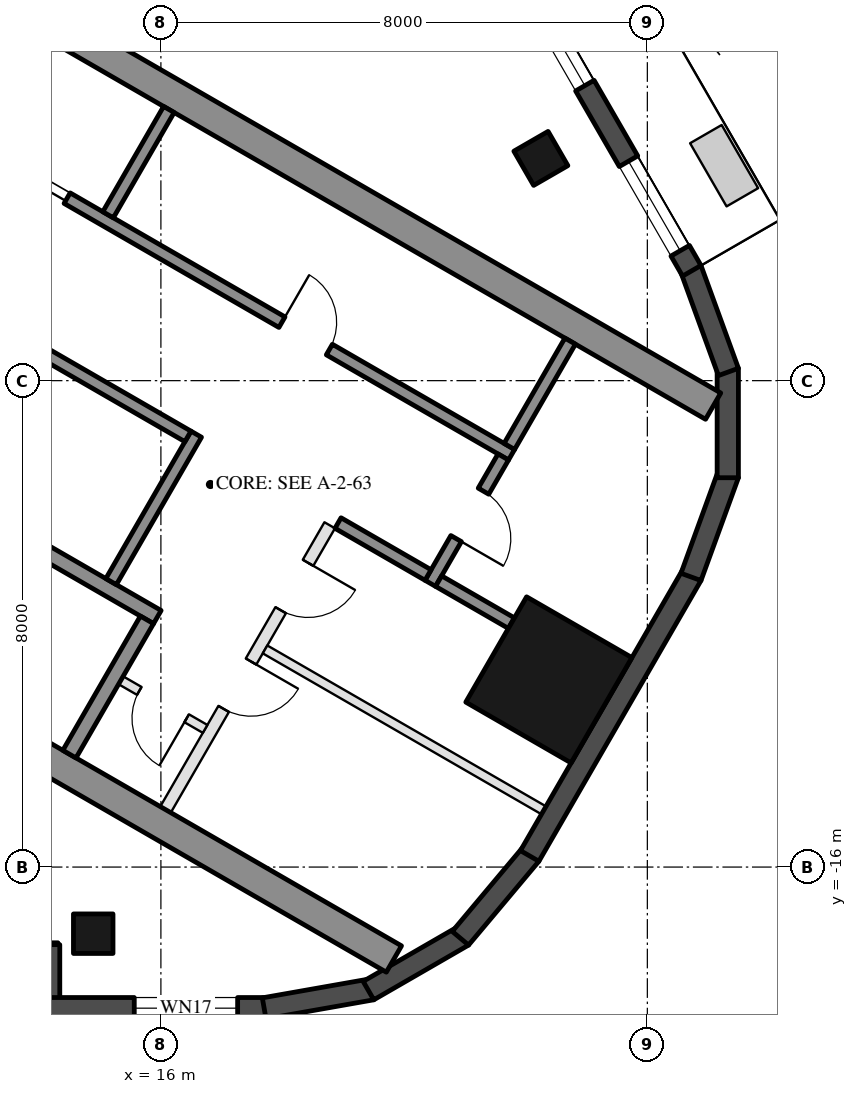
"""IFC4 building model, lengths in metres.
Left out: names, types, materials, properties, quantities, classifications, styles, units other than length and angle.
Written with IfcOpenShell. Run it as: python <this file> out.ifc"""

import sys

from ifc_helpers import new_model, si_unit, direction, frame, frame_2d, origin, origin_2d, place, context, subcontext, project, spatial, rectangle, hollow_rectangle, extrude, boolean, halfspace, element, fill, save


model = new_model("IFC4")
c1 = context("Model", 3, precision=1e-05, world=origin(), true_north=direction((0.0, 1.0)))
c2 = subcontext(c1, "Body", "Model", "MODEL_VIEW")
j1 = project(units=[si_unit("LENGTHUNIT", "METRE"), si_unit("PLANEANGLEUNIT", "RADIAN")], contexts=[c1])
p1 = place(None, origin())
s1 = spatial("IfcSite", under=j1, at=p1, CompositionType="ELEMENT")
p2 = place(p1, origin())
s2 = spatial("IfcBuilding", under=s1, at=p2, CompositionType="ELEMENT")
p3 = place(p2, frame((0.0, 0.0, 272.6)))
s3 = spatial("IfcBuildingStorey", under=s2, at=p3, CompositionType="ELEMENT", Elevation=272.6)
for number, where, z_axis, x_axis in (
    (1, (14.887, -17.096, 0.0), (0.0, 0.0, 1.0), (-1.0, 0.0, 0.0)),
    (2, (22.249, -4.345, 0.0), (0.0, 0.0, 1.0), (-0.5, 0.866, 0.0)),
):
    element("IfcColumn", number, at=place(p3, frame(where, z_axis=z_axis, x_axis=x_axis)), inside=s3, PredefinedType="COLUMN", context=c2, shape_type="SweptSolid", body=[
        boolean("DIFFERENCE", extrude(hollow_rectangle(XDim=0.65, YDim=0.65, WallThickness=0.03, at=origin_2d()), origin(), (0.0, 0.0, 1.0), 3.7), halfspace(frame((0.0, 0.0, 3.653), z_axis=(0.0, 0.0, 1.0), x_axis=(1.0, 0.0, 0.0)), False)),
    ])
p4 = place(p3, frame((22.38, -12.921, 0.0), z_axis=(0.0, 0.0, 1.0), x_axis=(0.5, 0.866025403784, 0.0)))
e3 = element("IfcColumn", 3, at=p4, inside=s3, PredefinedType="COLUMN", context=c2, shape_type="SweptSolid", body=[
    boolean("DIFFERENCE", extrude(hollow_rectangle(XDim=2.0, YDim=2.0, WallThickness=0.05, at=origin_2d()), origin(), (0.0, 0.0, 1.0), 3.7), halfspace(frame((0.0, 0.0, 3.587), z_axis=(0.0, 0.0, 1.0), x_axis=(1.0, 0.0, 0.0)), False)),
])
p5 = place(p3, frame((8.024, -17.421, 0.0), z_axis=(0.0, 0.0, 1.0), x_axis=(1.0, 0.0, 0.0)))
e4 = element("IfcWall", 4, at=p5, inside=s3, PredefinedType="SOLIDWALL", context=c2, shape_type="SweptSolid", body=[
    extrude(rectangle(XDim=6.283, YDim=0.35, at=frame_2d((3.142, 0.0))), origin(), (0.0, 0.0, 1.0), 3.55),
])
p6 = place(p5, frame((3.563, 0.0, 0.0)))
e5 = element("IfcOpeningElement", 5, at=p6, cuts=e4, PredefinedType="OPENING", context=c2, shape_type="SweptSolid", body=[
    extrude(rectangle(XDim=2.4, YDim=2.4, at=frame_2d((1.2, 1.2))), frame((0.0, 0.185, 0.0), z_axis=(0.0, -1.0, 0.0), x_axis=(1.0, 0.0, 0.0)), (0.0, 0.0, 1.0), 0.37),
])
p7 = place(p5, frame((0.77, 0.0, 0.3)))
e6 = element("IfcOpeningElement", 6, at=p7, cuts=e4, PredefinedType="OPENING", context=c2, shape_type="SweptSolid", body=[
    extrude(rectangle(XDim=2.4, YDim=2.65, at=frame_2d((1.2, 1.325))), frame((0.0, 0.185, 0.0), z_axis=(0.0, -1.0, 0.0), x_axis=(1.0, 0.0, 0.0)), (0.0, 0.0, 1.0), 0.37),
])
p8 = place(p3, frame((14.162, -17.276, 0.0), z_axis=(0.0, 0.0, 1.0), x_axis=(0.0, -1.0, 0.0)))
e7 = element("IfcWall", 7, at=p8, inside=s3, PredefinedType="SOLIDWALL", context=c2, shape_type="SweptSolid", body=[
    extrude(rectangle(XDim=1.22, YDim=0.35, at=frame_2d((0.61, 0.0))), origin(), (0.0, 0.0, 1.0), 3.55),
])
p9 = place(p3, frame((13.987, -18.321, 0.0), z_axis=(0.0, 0.0, 1.0), x_axis=(1.0, 0.0, 0.0)))
e8 = element("IfcWall", 8, at=p9, inside=s3, PredefinedType="SOLIDWALL", context=c2, shape_type="SweptSolid", body=[
    extrude(rectangle(XDim=3.742, YDim=0.35, at=frame_2d((1.871, 0.0))), origin(), (0.0, 0.0, 1.0), 3.55),
])
p10 = place(p9, frame((1.575, 0.0, 0.3)))
e9 = element("IfcOpeningElement", 9, at=p10, cuts=e8, PredefinedType="OPENING", context=c2, shape_type="SweptSolid", body=[
    extrude(rectangle(XDim=1.7, YDim=2.65, at=frame_2d((0.85, 1.325))), frame((0.0, 0.185, 0.0), z_axis=(0.0, -1.0, 0.0), x_axis=(1.0, 0.0, 0.0)), (0.0, 0.0, 1.0), 0.37),
])
p11 = place(p3, frame((17.698, -18.323, 0.0), z_axis=(0.0, 0.0, 1.0), x_axis=(0.984810858511, 0.173630564586, 0.0)))
e10 = element("IfcWall", 10, at=p11, inside=s3, PredefinedType="SOLIDWALL", context=c2, shape_type="SweptSolid", body=[
    extrude(rectangle(XDim=1.8, YDim=0.35, at=frame_2d((0.9, 0.0))), origin(), (0.0, 0.0, 1.0), 3.55),
])
p12 = place(p3, frame((19.414, -18.032, 0.0), z_axis=(0.0, 0.0, 1.0), x_axis=(0.866047807691, 0.499961193289, 0.0)))
e11 = element("IfcWall", 11, at=p12, inside=s3, PredefinedType="SOLIDWALL", context=c2, shape_type="SweptSolid", body=[
    extrude(rectangle(XDim=1.8, YDim=0.35, at=frame_2d((0.9, 0.0))), origin(), (0.0, 0.0, 1.0), 3.55),
])
p13 = place(p3, frame((20.926, -17.171, 0.0), z_axis=(0.0, 0.0, 1.0), x_axis=(0.642756114672, 0.766070869471, 0.0)))
e12 = element("IfcWall", 12, at=p13, inside=s3, PredefinedType="SOLIDWALL", context=c2, shape_type="SweptSolid", body=[
    extrude(rectangle(XDim=1.8, YDim=0.35, at=frame_2d((0.9, 0.0))), origin(), (0.0, 0.0, 1.0), 3.55),
])
p14 = place(p3, frame((22.065, -15.817, 0.0), z_axis=(0.0, 0.0, 1.0), x_axis=(0.500025039717, 0.866010946615, 0.0)))
e13 = element("IfcWall", 13, at=p14, inside=s3, PredefinedType="SOLIDWALL", context=c2, shape_type="SweptSolid", body=[
    extrude(rectangle(XDim=5.331, YDim=0.35, at=frame_2d((2.666, 0.0))), origin(), (0.0, 0.0, 1.0), 3.55),
])
p15 = place(p3, frame((24.718, -11.228, 0.0), z_axis=(0.0, 0.0, 1.0), x_axis=(0.34206975284, 0.939674562916, 0.0)))
e14 = element("IfcWall", 14, at=p15, inside=s3, PredefinedType="SOLIDWALL", context=c2, shape_type="SweptSolid", body=[
    extrude(rectangle(XDim=1.8, YDim=0.35, at=frame_2d((0.9, 0.0))), origin(), (0.0, 0.0, 1.0), 3.55),
])
p16 = place(p3, frame((25.323, -9.597, 0.0), z_axis=(0.0, 0.0, 1.0), x_axis=(0.0, 1.0, 0.0)))
e15 = element("IfcWall", 15, at=p16, inside=s3, PredefinedType="SOLIDWALL", context=c2, shape_type="SweptSolid", body=[
    extrude(rectangle(XDim=1.8, YDim=0.35, at=frame_2d((0.9, 0.0))), origin(), (0.0, 0.0, 1.0), 3.55),
])
p17 = place(p3, frame((25.333, -7.857, 0.0), z_axis=(0.0, 0.0, 1.0), x_axis=(-0.34206975284, 0.939674562916, 0.0)))
e16 = element("IfcWall", 16, at=p17, inside=s3, PredefinedType="SOLIDWALL", context=c2, shape_type="SweptSolid", body=[
    extrude(rectangle(XDim=1.8, YDim=0.35, at=frame_2d((0.9, 0.0))), origin(), (0.0, 0.0, 1.0), 3.55),
])
p18 = place(p3, frame((24.731, -6.193, 0.0), z_axis=(0.0, 0.0, 1.0), x_axis=(-0.500007749075, 0.866020929808, 0.0)))
e17 = element("IfcWall", 17, at=p18, inside=s3, PredefinedType="SOLIDWALL", context=c2, shape_type="SweptSolid", body=[
    extrude(rectangle(XDim=11.185, YDim=0.35, at=frame_2d((5.593, 0.0))), origin(), (0.0, 0.0, 1.0), 3.55),
])
p19 = place(p18, frame((0.381, 0.0, 0.3)))
e18 = element("IfcOpeningElement", 18, at=p19, cuts=e17, PredefinedType="OPENING", context=c2, shape_type="SweptSolid", body=[
    extrude(rectangle(XDim=1.7, YDim=2.65, at=frame_2d((0.85, 1.325))), frame((0.0, 0.185, 0.0), z_axis=(0.0, -1.0, 0.0), x_axis=(1.0, 0.0, 0.0)), (0.0, 0.0, 1.0), 0.37),
])
p20 = place(p18, frame((7.21, 0.0, 0.0)))
e19 = element("IfcOpeningElement", 19, at=p20, cuts=e17, PredefinedType="OPENING", context=c2, shape_type="SweptSolid", body=[
    extrude(rectangle(XDim=2.4, YDim=2.4, at=frame_2d((1.2, 1.2))), frame((0.0, 0.185, 0.0), z_axis=(0.0, -1.0, 0.0), x_axis=(1.0, 0.0, 0.0)), (0.0, 0.0, 1.0), 0.37),
])
p21 = place(p18, frame((3.517, 0.0, 0.3)))
e20 = element("IfcOpeningElement", 20, at=p21, cuts=e17, PredefinedType="OPENING", context=c2, shape_type="SweptSolid", body=[
    extrude(rectangle(XDim=1.5, YDim=2.65, at=frame_2d((0.75, 1.325))), frame((0.0, 0.185, 0.0), z_axis=(0.0, -1.0, 0.0), x_axis=(1.0, 0.0, 0.0)), (0.0, 0.0, 1.0), 0.37),
])
p22 = place(p18, frame((5.317, 0.0, 0.3)))
e21 = element("IfcOpeningElement", 21, at=p22, cuts=e17, PredefinedType="OPENING", context=c2, shape_type="SweptSolid", body=[
    extrude(rectangle(XDim=1.5, YDim=2.65, at=frame_2d((0.75, 1.325))), frame((0.0, 0.185, 0.0), z_axis=(0.0, -1.0, 0.0), x_axis=(1.0, 0.0, 0.0)), (0.0, 0.0, 1.0), 0.37),
])
for number, where, z_axis, x_axis in (
    (22, (8.547, -10.997, 0.0), (0.0, 0.0, 1.0), (0.866, -0.5, 0.0)),
    (23, (13.797, -1.903, 0.0), (0.0, 0.0, 1.0), (0.866, -0.5, 0.0)),
):
    element("IfcWall", number, at=place(p3, frame(where, z_axis=z_axis, x_axis=x_axis)), inside=s3, PredefinedType="SHEAR", context=c2, shape_type="SweptSolid", body=[
        extrude(rectangle(XDim=13.031, YDim=0.5, at=frame_2d((6.516, 0.0))), origin(), (0.0, 0.0, 1.0), 3.5),
    ])
p23 = place(p3, frame((10.356, -8.664, 0.0), z_axis=(0.0, 0.0, 1.0), x_axis=(0.866028629588, -0.499994412703, 0.0)))
e24 = element("IfcWall", 24, at=p23, inside=s3, PredefinedType="SHEAR", context=c2, shape_type="SweptSolid", body=[
    extrude(rectangle(XDim=6.45, YDim=0.25, at=frame_2d((3.225, 0.0))), origin(), (0.0, 0.0, 1.0), 3.5),
])
p24 = place(p23, frame((0.3, 0.0, 0.0)))
e25 = element("IfcOpeningElement", 25, at=p24, cuts=e24, PredefinedType="OPENING", context=c2, shape_type="SweptSolid", body=[
    extrude(rectangle(XDim=1.0, YDim=2.1, at=frame_2d((0.5, 1.05))), frame((0.0, 0.135, 0.0), z_axis=(0.0, -1.0, 0.0), x_axis=(1.0, 0.0, 0.0)), (0.0, 0.0, 1.0), 0.27),
])
p25 = place(p3, frame((14.496, -14.143, 0.0), z_axis=(0.0, 0.0, 1.0), x_axis=(0.500062241894, 0.865989465428, 0.0)))
e26 = element("IfcWall", 26, at=p25, inside=s3, PredefinedType="SHEAR", context=c2, shape_type="SweptSolid", body=[
    extrude(rectangle(XDim=2.55, YDim=0.25, at=frame_2d((1.275, 0.0))), origin(), (0.0, 0.0, 1.0), 3.5),
])
p26 = place(p3, frame((15.181, -11.305, 0.0), z_axis=(0.0, 0.0, 1.0), x_axis=(0.49994636267, 0.866056369097, 0.0)))
e27 = element("IfcWall", 27, at=p26, inside=s3, PredefinedType="SHEAR", context=c2, shape_type="SweptSolid", body=[
    extrude(rectangle(XDim=2.8, YDim=0.2, at=frame_2d((1.4, 0.0))), origin(), (0.0, 0.0, 1.0), 3.5),
])
p27 = place(p3, frame((14.02, -7.517, 0.0), z_axis=(0.0, 0.0, 1.0), x_axis=(0.866034573852, -0.49998411664, 0.0)))
e28 = element("IfcWall", 28, at=p27, inside=s3, PredefinedType="SHEAR", context=c2, shape_type="SweptSolid", body=[
    extrude(rectangle(XDim=2.8, YDim=0.2, at=frame_2d((1.4, 0.0))), origin(), (0.0, 0.0, 1.0), 3.5),
])
p28 = place(p3, frame((12.968, -4.138, 0.0), z_axis=(0.0, 0.0, 1.0), x_axis=(0.866028328073, -0.49999493495, 0.0)))
e29 = element("IfcWall", 29, at=p28, inside=s3, PredefinedType="SHEAR", context=c2, shape_type="SweptSolid", body=[
    extrude(rectangle(XDim=10.16, YDim=0.2, at=frame_2d((5.08, 0.0))), origin(), (0.0, 0.0, 1.0), 3.5),
])
p29 = place(p28, frame((0.62, 0.0, 0.0)))
e30 = element("IfcOpeningElement", 30, at=p29, cuts=e29, PredefinedType="OPENING", context=c2, shape_type="SweptSolid", body=[
    extrude(rectangle(XDim=1.1, YDim=2.1, at=frame_2d((0.55, 1.05))), frame((0.0, 0.11, 0.0), z_axis=(0.0, -1.0, 0.0), x_axis=(1.0, 0.0, 0.0)), (0.0, 0.0, 1.0), 0.22),
])
p30 = place(p28, frame((5.8, 0.0, 0.0)))
e31 = element("IfcOpeningElement", 31, at=p30, cuts=e29, PredefinedType="OPENING", context=c2, shape_type="SweptSolid", body=[
    extrude(rectangle(XDim=0.9, YDim=2.1, at=frame_2d((0.45, 1.05))), frame((0.0, 0.11, 0.0), z_axis=(0.0, -1.0, 0.0), x_axis=(1.0, 0.0, 0.0)), (0.0, 0.0, 1.0), 0.22),
])
p31 = place(p3, frame((20.43, -11.333, 0.0), z_axis=(0.0, 0.0, 1.0), x_axis=(0.500001309137, 0.866024647952, 0.0)))
e32 = element("IfcWall", 32, at=p31, inside=s3, PredefinedType="SHEAR", context=c2, shape_type="SweptSolid", body=[
    extrude(rectangle(XDim=2.4, YDim=0.2, at=frame_2d((1.2, 0.0))), origin(), (0.0, 0.0, 1.0), 3.5),
])
p32 = place(p31, frame((0.85, 0.0, 0.0)))
e33 = element("IfcOpeningElement", 33, at=p32, cuts=e32, PredefinedType="OPENING", context=c2, shape_type="SweptSolid", body=[
    extrude(rectangle(XDim=0.9, YDim=2.1, at=frame_2d((0.45, 1.05))), frame((0.0, 0.11, 0.0), z_axis=(0.0, -1.0, 0.0), x_axis=(1.0, 0.0, 0.0)), (0.0, 0.0, 1.0), 0.22),
])
p33 = place(p3, frame((18.913, -10.342, 0.0), z_axis=(0.0, 0.0, 1.0), x_axis=(0.866038183914, -0.499977863513, 0.0)))
e34 = element("IfcWall", 34, at=p33, inside=s3, PredefinedType="SHEAR", context=c2, shape_type="SweptSolid", body=[
    extrude(rectangle(XDim=1.71, YDim=0.2, at=frame_2d((0.855, 0.0))), origin(), (0.0, 0.0, 1.0), 3.5),
])
for number, where, z_axis, x_axis in (
    (35, (15.131, -5.272, 0.0), (0.0, 0.0, 1.0), (0.5, 0.866, 0.0)),
    (36, (21.73, -9.082, 0.0), (0.0, 0.0, 1.0), (0.5, 0.866, 0.0)),
):
    element("IfcWall", number, at=place(p3, frame(where, z_axis=z_axis, x_axis=x_axis)), inside=s3, PredefinedType="SHEAR", context=c2, shape_type="SweptSolid", body=[
        extrude(rectangle(XDim=2.0, YDim=0.2, at=frame_2d((1.0, 0.0))), origin(), (0.0, 0.0, 1.0), 3.5),
    ])
p34 = place(p3, frame((20.567, -11.297, 0.0), z_axis=(0.0, 0.0, 1.0), x_axis=(0.866094443108, -0.499880401313, 0.0)))
e37 = element("IfcWall", 37, at=p34, inside=s3, PredefinedType="SHEAR", context=c2, shape_type="SweptSolid", body=[
    extrude(rectangle(XDim=1.383, YDim=0.2, at=frame_2d((0.691, 0.0))), origin(), (0.0, 0.0, 1.0), 3.5),
])
p35 = place(p3, frame((16.076, -15.055, 0.0), z_axis=(0.0, 0.0, 1.0), x_axis=(0.499995103361, 0.866028230842, 0.0)))
e38 = element("IfcWall", 38, at=p35, inside=s3, PredefinedType="PARTITIONING", context=c2, shape_type="SweptSolid", body=[
    extrude(rectangle(XDim=5.4, YDim=0.2, at=frame_2d((2.7, 0.0))), origin(), (0.0, 0.0, 1.0), 3.5),
])
p36 = place(p35, frame((1.913, 0.0, 0.0)))
e39 = element("IfcOpeningElement", 39, at=p36, cuts=e38, PredefinedType="OPENING", context=c2, shape_type="SweptSolid", body=[
    extrude(rectangle(XDim=0.9, YDim=2.1, at=frame_2d((0.45, 1.05))), frame((0.0, 0.11, 0.0), z_axis=(0.0, -1.0, 0.0), x_axis=(1.0, 0.0, 0.0)), (0.0, 0.0, 1.0), 0.22),
])
p37 = place(p35, frame((3.788, 0.0, 0.0)))
e40 = element("IfcOpeningElement", 40, at=p37, cuts=e38, PredefinedType="OPENING", context=c2, shape_type="SweptSolid", body=[
    extrude(rectangle(XDim=0.9, YDim=2.1, at=frame_2d((0.45, 1.05))), frame((0.0, 0.11, 0.0), z_axis=(0.0, -1.0, 0.0), x_axis=(1.0, 0.0, 0.0)), (0.0, 0.0, 1.0), 0.22),
])
p38 = place(p3, frame((15.342, -12.928, 0.0), z_axis=(0.0, 0.0, 1.0), x_axis=(0.865989903783, -0.500061482766, 0.0)))
e41 = element("IfcWall", 41, at=p38, inside=s3, PredefinedType="PARTITIONING", context=c2, shape_type="SweptSolid", body=[
    extrude(rectangle(XDim=1.6, YDim=0.15, at=frame_2d((0.8, 0.0))), origin(), (0.0, 0.0, 1.0), 3.5),
])
p39 = place(p38, frame((0.35, 0.0, 0.0)))
e42 = element("IfcOpeningElement", 42, at=p39, cuts=e41, PredefinedType="OPENING", context=c2, shape_type="SweptSolid", body=[
    extrude(rectangle(XDim=0.9, YDim=2.1, at=frame_2d((0.45, 1.05))), frame((0.0, 0.085, 0.0), z_axis=(0.0, -1.0, 0.0), x_axis=(1.0, 0.0, 0.0)), (0.0, 0.0, 1.0), 0.17),
])
p40 = place(p3, frame((17.713, -12.42, 0.0), z_axis=(0.0, 0.0, 1.0), x_axis=(0.866028878405, -0.499993981732, 0.0)))
e43 = element("IfcWall", 43, at=p40, inside=s3, PredefinedType="PARTITIONING", context=c2, shape_type="SweptSolid", body=[
    extrude(rectangle(XDim=5.292, YDim=0.15, at=frame_2d((2.646, 0.0))), origin(), (0.0, 0.0, 1.0), 3.5),
])
p41 = place(p10, origin())
e44 = element("IfcWindow", 44, at=p41, inside=s3, PartitioningType="SINGLE_PANEL", PredefinedType="WINDOW", context=c2, shape_type="SweptSolid", body=[
    extrude(rectangle(XDim=1.7, YDim=2.65, at=frame_2d((0.85, 1.325))), frame((0.0, 0.03, 0.0), z_axis=(0.0, -1.0, 0.0), x_axis=(1.0, 0.0, 0.0)), (0.0, 0.0, 1.0), 0.06),
])
fill(e9, e44)
p42 = place(p19, origin())
e45 = element("IfcWindow", 45, at=p42, inside=s3, PartitioningType="SINGLE_PANEL", PredefinedType="WINDOW", context=c2, shape_type="SweptSolid", body=[
    extrude(rectangle(XDim=1.7, YDim=2.65, at=frame_2d((0.85, 1.325))), frame((0.0, 0.03, 0.0), z_axis=(0.0, -1.0, 0.0), x_axis=(1.0, 0.0, 0.0)), (0.0, 0.0, 1.0), 0.06),
])
fill(e18, e45)
p43 = place(p21, origin())
e46 = element("IfcWindow", 46, at=p43, inside=s3, PartitioningType="SINGLE_PANEL", PredefinedType="WINDOW", context=c2, shape_type="SweptSolid", body=[
    extrude(rectangle(XDim=1.5, YDim=2.65, at=frame_2d((0.75, 1.325))), frame((0.0, 0.03, 0.0), z_axis=(0.0, -1.0, 0.0), x_axis=(1.0, 0.0, 0.0)), (0.0, 0.0, 1.0), 0.06),
])
fill(e20, e46)
p44 = place(p39, frame((0.9, 0.0, 0.0), z_axis=(0.0, 0.0, 1.0), x_axis=(-1.0, 0.0, 0.0)))
e47 = element("IfcDoor", 47, at=p44, inside=s3, OperationType="SINGLE_SWING_LEFT", PredefinedType="DOOR", context=c2, shape_type="SweptSolid", body=[
    extrude(rectangle(XDim=0.9, YDim=2.1, at=frame_2d((0.45, 1.05))), frame((0.0, 0.025, 0.0), z_axis=(0.0, -1.0, 0.0), x_axis=(1.0, 0.0, 0.0)), (0.0, 0.0, 1.0), 0.05),
])
fill(e42, e47)
p45 = place(p29, origin())
e48 = element("IfcDoor", 48, at=p45, inside=s3, OperationType="DOUBLE_DOOR_SLIDING", PredefinedType="DOOR", context=c2, shape_type="SweptSolid", body=[
    extrude(rectangle(XDim=1.1, YDim=2.1, at=frame_2d((0.55, 1.05))), frame((0.0, 0.025, 0.0), z_axis=(0.0, -1.0, 0.0), x_axis=(1.0, 0.0, 0.0)), (0.0, 0.0, 1.0), 0.05),
])
fill(e30, e48)
p46 = place(p30, origin())
e49 = element("IfcDoor", 49, at=p46, inside=s3, OperationType="SINGLE_SWING_LEFT", PredefinedType="DOOR", context=c2, shape_type="SweptSolid", body=[
    extrude(rectangle(XDim=0.9, YDim=2.1, at=frame_2d((0.45, 1.05))), frame((0.0, 0.025, 0.0), z_axis=(0.0, -1.0, 0.0), x_axis=(1.0, 0.0, 0.0)), (0.0, 0.0, 1.0), 0.05),
])
fill(e31, e49)
p47 = place(p32, frame((0.9, 0.0, 0.0), z_axis=(0.0, 0.0, 1.0), x_axis=(-1.0, 0.0, 0.0)))
e50 = element("IfcDoor", 50, at=p47, inside=s3, OperationType="SINGLE_SWING_RIGHT", PredefinedType="DOOR", context=c2, shape_type="SweptSolid", body=[
    extrude(rectangle(XDim=0.9, YDim=2.1, at=frame_2d((0.45, 1.05))), frame((0.0, 0.025, 0.0), z_axis=(0.0, -1.0, 0.0), x_axis=(1.0, 0.0, 0.0)), (0.0, 0.0, 1.0), 0.05),
])
fill(e33, e50)
p48 = place(p36, frame((0.9, 0.0, 0.0), z_axis=(0.0, 0.0, 1.0), x_axis=(-1.0, 0.0, 0.0)))
e51 = element("IfcDoor", 51, at=p48, inside=s3, OperationType="SINGLE_SWING_LEFT", PredefinedType="DOOR", context=c2, shape_type="SweptSolid", body=[
    extrude(rectangle(XDim=0.9, YDim=2.1, at=frame_2d((0.45, 1.05))), frame((0.0, 0.025, 0.0), z_axis=(0.0, -1.0, 0.0), x_axis=(1.0, 0.0, 0.0)), (0.0, 0.0, 1.0), 0.05),
])
fill(e39, e51)
p49 = place(p37, frame((0.9, 0.0, 0.0), z_axis=(0.0, 0.0, 1.0), x_axis=(-1.0, 0.0, 0.0)))
e52 = element("IfcDoor", 52, at=p49, inside=s3, OperationType="SINGLE_SWING_LEFT", PredefinedType="DOOR", context=c2, shape_type="SweptSolid", body=[
    extrude(rectangle(XDim=0.9, YDim=2.1, at=frame_2d((0.45, 1.05))), frame((0.0, 0.025, 0.0), z_axis=(0.0, -1.0, 0.0), x_axis=(1.0, 0.0, 0.0)), (0.0, 0.0, 1.0), 0.05),
])
fill(e40, e52)
save(model, sys.argv[1])
